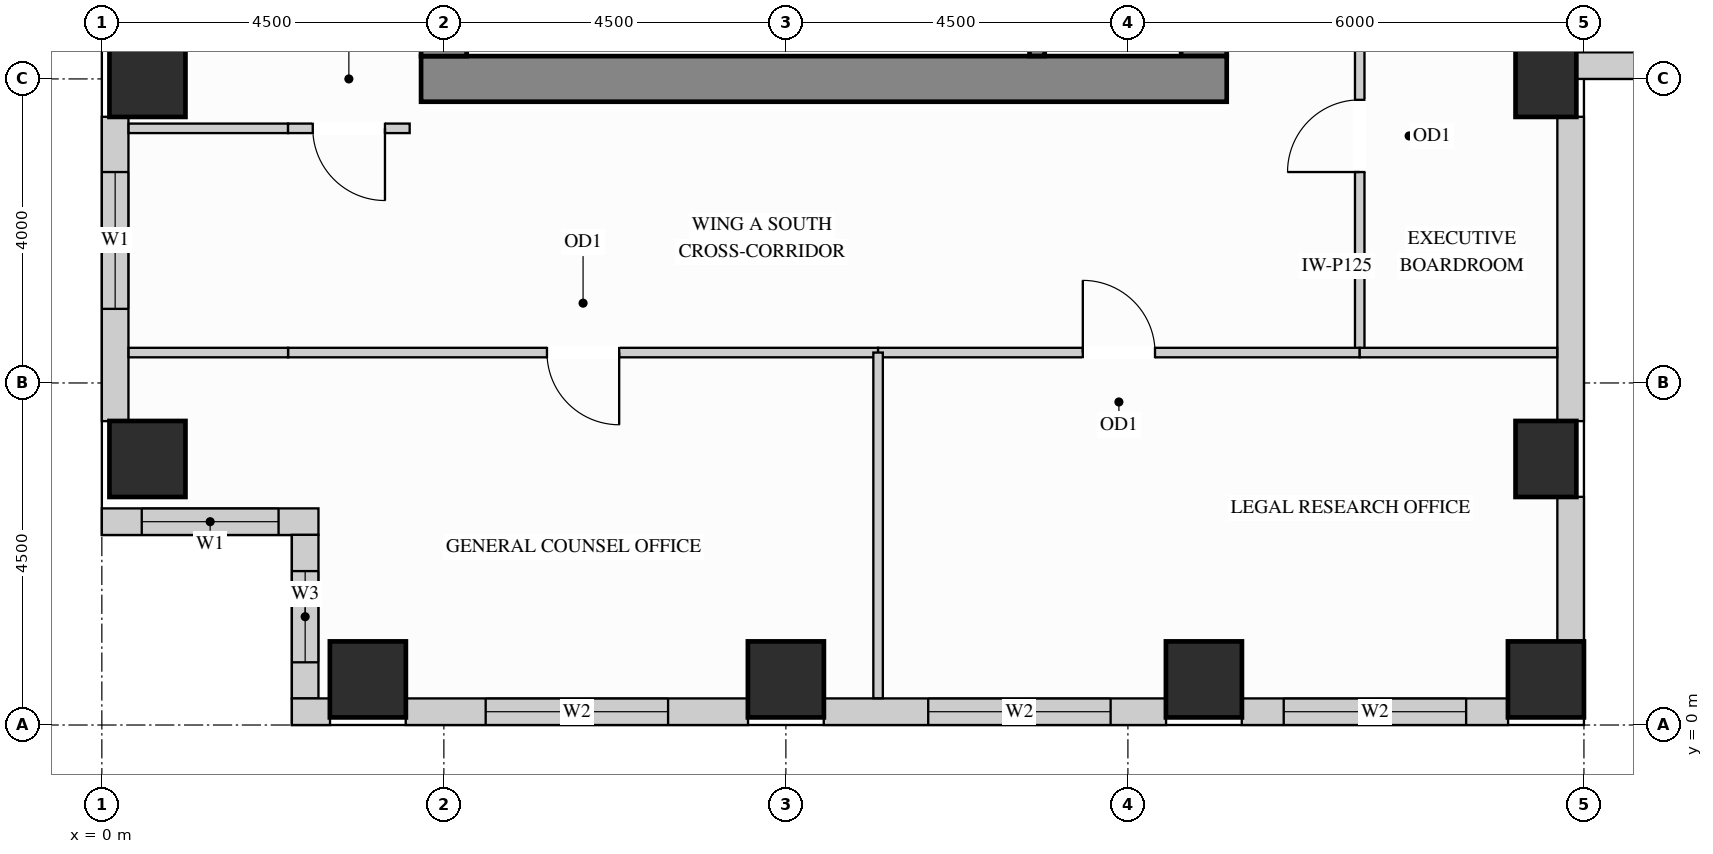
"""IFC4 building model, lengths in metres.
Left out: names, types, materials, properties, quantities, classifications, styles, units other than length and angle.
Written with IfcOpenShell. Run it as: python <this file> out.ifc"""

import sys

from ifc_helpers import new_model, si_unit, direction, frame, frame_2d, origin, origin_2d, place, context, subcontext, project, spatial, rectangle, extrude, source, transform, mapped, element, fill, save


model = new_model("IFC4")
c1 = context("Model", 3, precision=1e-05, world=origin(), true_north=direction((0.0, 1.0)))
c2 = subcontext(c1, "Body", "Model", "MODEL_VIEW")
j1 = project(units=[si_unit("LENGTHUNIT", "METRE"), si_unit("PLANEANGLEUNIT", "RADIAN")], contexts=[c1])
p1 = place(None, origin())
s1 = spatial("IfcSite", under=j1, at=p1, CompositionType="ELEMENT")
p2 = place(p1, origin())
s2 = spatial("IfcBuilding", under=s1, at=p2, CompositionType="ELEMENT")
p3 = place(p2, frame((0.0, 0.0, 179.1)))
s3 = spatial("IfcBuildingStorey", under=s2, at=p3, CompositionType="ELEMENT", Elevation=179.1)
m1 = source(origin(), c2, "Body", "SweptSolid", [
    extrude(rectangle(XDim=0.8, YDim=1.0, at=origin_2d()), origin(), (0.0, 0.0, 1.0), 3.4),
])
for number, where, z_axis, x_axis in (
    (1, (19.0, 3.5, 0.0), (0.0, 0.0, 1.0), (1.0, 0.0, 0.0)),
    (2, (19.0, 8.5, 0.0), (0.0, 0.0, 1.0), (1.0, 0.0, 0.0)),
):
    element("IfcColumn", number, at=place(p3, frame(where, z_axis=z_axis, x_axis=x_axis)), inside=s3, PredefinedType="COLUMN", context=c2, shape_type="MappedRepresentation", body=[
        mapped(m1, transform((0.0, 0.0, 0.0), x_axis=(1.0, 0.0, 0.0), y_axis=(0.0, 1.0, 0.0), z_axis=(0.0, 0.0, 1.0))),
    ])
m2 = source(origin(), c2, "Body", "SweptSolid", [
    extrude(rectangle(XDim=1.0, YDim=1.0, at=origin_2d()), origin(), (0.0, 0.0, 1.0), 3.4),
])
for number, where, z_axis, x_axis in (
    (3, (14.5, 0.6, 0.0), (0.0, 0.0, 1.0), (1.0, 0.0, 0.0)),
    (4, (19.0, 0.6, 0.0), (0.0, 0.0, 1.0), (1.0, 0.0, 0.0)),
    (5, (3.5, 0.6, 0.0), (0.0, 0.0, 1.0), (1.0, 0.0, 0.0)),
    (6, (9.0, 0.6, 0.0), (0.0, 0.0, 1.0), (1.0, 0.0, 0.0)),
    (7, (0.6, 3.5, 0.0), (0.0, 0.0, 1.0), (1.0, 0.0, 0.0)),
    (8, (0.6, 8.5, 0.0), (0.0, 0.0, 1.0), (1.0, 0.0, 0.0)),
):
    element("IfcColumn", number, at=place(p3, frame(where, z_axis=z_axis, x_axis=x_axis)), inside=s3, PredefinedType="COLUMN", context=c2, shape_type="MappedRepresentation", body=[
        mapped(m2, transform((0.0, 0.0, 0.0), x_axis=(1.0, 0.0, 0.0), y_axis=(0.0, 1.0, 0.0), z_axis=(0.0, 0.0, 1.0))),
    ])
m3 = source(origin(), c2, "Body", "SweptSolid", [
    extrude(rectangle(XDim=10.02, YDim=0.6, at=frame_2d((5.01, 0.0))), origin(), (0.0, 0.0, 1.0), 3.4),
])
p4 = place(p3, frame((14.5, 8.8, 0.0), z_axis=(0.0, 0.0, 1.0), x_axis=(0.0, 1.0, 0.0)))
e9 = element("IfcWall", 9, at=p4, inside=s3, PredefinedType="SHEAR", context=c2, shape_type="MappedRepresentation", body=[
    mapped(m3, transform((0.0, 0.0, 0.0), x_axis=(1.0, 0.0, 0.0), y_axis=(0.0, 1.0, 0.0), z_axis=(0.0, 0.0, 1.0))),
])
m4 = source(origin(), c2, "Body", "SweptSolid", [
    extrude(rectangle(XDim=10.6, YDim=0.6, at=frame_2d((5.3, 0.0))), origin(), (0.0, 0.0, 1.0), 3.4),
])
p5 = place(p3, frame((4.2, 8.5, 0.0), z_axis=(0.0, 0.0, 1.0), x_axis=(1.0, 0.0, 0.0)))
e10 = element("IfcWall", 10, at=p5, inside=s3, PredefinedType="SHEAR", context=c2, shape_type="MappedRepresentation", body=[
    mapped(m4, transform((0.0, 0.0, 0.0), x_axis=(1.0, 0.0, 0.0), y_axis=(0.0, 1.0, 0.0), z_axis=(0.0, 0.0, 1.0))),
])
m5 = source(origin(), c2, "Body", "SweptSolid", [
    extrude(rectangle(XDim=20.4, YDim=0.6, at=frame_2d((10.2, 0.0))), origin(), (0.0, 0.0, 1.0), 3.4),
])
p6 = place(p3, frame((4.5, 8.8, 0.0), z_axis=(0.0, 0.0, 1.0), x_axis=(0.0, 1.0, 0.0)))
e11 = element("IfcWall", 11, at=p6, inside=s3, PredefinedType="SHEAR", context=c2, shape_type="MappedRepresentation", body=[
    mapped(m5, transform((0.0, 0.0, 0.0), x_axis=(1.0, 0.0, 0.0), y_axis=(0.0, 1.0, 0.0), z_axis=(0.0, 0.0, 1.0))),
])
p7 = place(p3, frame((0.175, 8.002, 0.0), z_axis=(0.0, 0.0, 1.0), x_axis=(0.0, -1.0, 0.0)))
e12 = element("IfcWall", 12, at=p7, inside=s3, PredefinedType="SOLIDWALL", context=c2, shape_type="SweptSolid", body=[
    extrude(rectangle(XDim=4.004, YDim=0.35, at=frame_2d((2.002, 0.0))), origin(), (0.0, 0.0, 1.0), 2.612),
])
p8 = place(p7, frame((0.727, 0.0, 0.78)))
e13 = element("IfcOpeningElement", 13, at=p8, cuts=e12, PredefinedType="OPENING", context=c2, shape_type="SweptSolid", body=[
    extrude(rectangle(XDim=1.8, YDim=1.652, at=frame_2d((0.9, 0.826))), frame((0.0, 0.185, 0.0), z_axis=(0.0, -1.0, 0.0), x_axis=(1.0, 0.0, 0.0)), (0.0, 0.0, 1.0), 0.37),
])
p9 = place(p3, frame((0.0, 2.675, 0.0), z_axis=(0.0, 0.0, 1.0), x_axis=(1.0, 0.0, 0.0)))
e14 = element("IfcWall", 14, at=p9, inside=s3, PredefinedType="SOLIDWALL", context=c2, shape_type="SweptSolid", body=[
    extrude(rectangle(XDim=2.85, YDim=0.35, at=frame_2d((1.425, 0.0))), origin(), (0.0, 0.0, 1.0), 3.385),
])
p10 = place(p9, frame((0.525, 0.0, 0.78)))
e15 = element("IfcOpeningElement", 15, at=p10, cuts=e14, PredefinedType="OPENING", context=c2, shape_type="SweptSolid", body=[
    extrude(rectangle(XDim=1.8, YDim=2.1, at=frame_2d((0.9, 1.05))), frame((0.0, 0.185, 0.0), z_axis=(0.0, -1.0, 0.0), x_axis=(1.0, 0.0, 0.0)), (0.0, 0.0, 1.0), 0.37),
])
p11 = place(p3, frame((2.675, 2.502, 0.0), z_axis=(0.0, 0.0, 1.0), x_axis=(0.0, -1.0, 0.0)))
e16 = element("IfcWall", 16, at=p11, inside=s3, PredefinedType="SOLIDWALL", context=c2, shape_type="SweptSolid", body=[
    extrude(rectangle(XDim=2.154, YDim=0.35, at=frame_2d((1.077, 0.0))), origin(), (0.0, 0.0, 1.0), 3.385),
])
p12 = place(p11, frame((0.477, 0.0, 0.78)))
e17 = element("IfcOpeningElement", 17, at=p12, cuts=e16, PredefinedType="OPENING", context=c2, shape_type="SweptSolid", body=[
    extrude(rectangle(XDim=1.2, YDim=2.1, at=frame_2d((0.6, 1.05))), frame((0.0, 0.185, 0.0), z_axis=(0.0, -1.0, 0.0), x_axis=(1.0, 0.0, 0.0)), (0.0, 0.0, 1.0), 0.37),
])
m6 = source(origin(), c2, "Body", "SweptSolid", [
    extrude(rectangle(XDim=0.502, YDim=0.35, at=frame_2d((0.251, 0.0))), origin(), (0.0, 0.0, 1.0), 3.385),
])
p13 = place(p3, frame((2.5, 0.175, 0.0), z_axis=(0.0, 0.0, 1.0), x_axis=(1.0, 0.0, 0.0)))
e18 = element("IfcWall", 18, at=p13, inside=s3, PredefinedType="SOLIDWALL", context=c2, shape_type="MappedRepresentation", body=[
    mapped(m6, transform((0.0, 0.0, 0.0), x_axis=(1.0, 0.0, 0.0), y_axis=(0.0, 1.0, 0.0), z_axis=(0.0, 0.0, 1.0))),
])
p14 = place(p3, frame((3.998, 0.175, 0.0), z_axis=(0.0, 0.0, 1.0), x_axis=(1.0, 0.0, 0.0)))
e19 = element("IfcWall", 19, at=p14, inside=s3, PredefinedType="SOLIDWALL", context=c2, shape_type="SweptSolid", body=[
    extrude(rectangle(XDim=4.504, YDim=0.35, at=frame_2d((2.252, 0.0))), origin(), (0.0, 0.0, 1.0), 2.612),
])
p15 = place(p14, frame((1.052, 0.0, 0.78)))
e20 = element("IfcOpeningElement", 20, at=p15, cuts=e19, PredefinedType="OPENING", context=c2, shape_type="SweptSolid", body=[
    extrude(rectangle(XDim=2.4, YDim=1.652, at=frame_2d((1.2, 0.826))), frame((0.0, 0.185, 0.0), z_axis=(0.0, -1.0, 0.0), x_axis=(1.0, 0.0, 0.0)), (0.0, 0.0, 1.0), 0.37),
])
p16 = place(p3, frame((9.498, 0.175, 0.0), z_axis=(0.0, 0.0, 1.0), x_axis=(1.0, 0.0, 0.0)))
e21 = element("IfcWall", 21, at=p16, inside=s3, PredefinedType="SOLIDWALL", context=c2, shape_type="SweptSolid", body=[
    extrude(rectangle(XDim=4.504, YDim=0.35, at=frame_2d((2.252, 0.0))), origin(), (0.0, 0.0, 1.0), 2.612),
])
p17 = place(p16, frame((1.375, 0.0, 0.78)))
e22 = element("IfcOpeningElement", 22, at=p17, cuts=e21, PredefinedType="OPENING", context=c2, shape_type="SweptSolid", body=[
    extrude(rectangle(XDim=2.4, YDim=1.652, at=frame_2d((1.2, 0.826))), frame((0.0, 0.185, 0.0), z_axis=(0.0, -1.0, 0.0), x_axis=(1.0, 0.0, 0.0)), (0.0, 0.0, 1.0), 0.37),
])
p18 = place(p3, frame((14.998, 0.175, 0.0), z_axis=(0.0, 0.0, 1.0), x_axis=(1.0, 0.0, 0.0)))
e23 = element("IfcWall", 23, at=p18, inside=s3, PredefinedType="SOLIDWALL", context=c2, shape_type="SweptSolid", body=[
    extrude(rectangle(XDim=3.504, YDim=0.35, at=frame_2d((1.752, 0.0))), origin(), (0.0, 0.0, 1.0), 2.612),
])
p19 = place(p18, frame((0.552, 0.0, 0.78)))
e24 = element("IfcOpeningElement", 24, at=p19, cuts=e23, PredefinedType="OPENING", context=c2, shape_type="SweptSolid", body=[
    extrude(rectangle(XDim=2.4, YDim=1.652, at=frame_2d((1.2, 0.826))), frame((0.0, 0.185, 0.0), z_axis=(0.0, -1.0, 0.0), x_axis=(1.0, 0.0, 0.0)), (0.0, 0.0, 1.0), 0.37),
])
m7 = source(origin(), c2, "Body", "SweptSolid", [
    extrude(rectangle(XDim=1.904, YDim=0.35, at=frame_2d((0.952, 0.0))), origin(), (0.0, 0.0, 1.0), 2.612),
])
p20 = place(p3, frame((19.325, 1.098, 0.0), z_axis=(0.0, 0.0, 1.0), x_axis=(0.0, 1.0, 0.0)))
e25 = element("IfcWall", 25, at=p20, inside=s3, PredefinedType="SOLIDWALL", context=c2, shape_type="MappedRepresentation", body=[
    mapped(m7, transform((0.0, 0.0, 0.0), x_axis=(1.0, 0.0, 0.0), y_axis=(0.0, 1.0, 0.0), z_axis=(0.0, 0.0, 1.0))),
])
m8 = source(origin(), c2, "Body", "SweptSolid", [
    extrude(rectangle(XDim=4.004, YDim=0.35, at=frame_2d((2.002, 0.0))), origin(), (0.0, 0.0, 1.0), 2.612),
])
p21 = place(p3, frame((19.325, 3.998, 0.0), z_axis=(0.0, 0.0, 1.0), x_axis=(0.0, 1.0, 0.0)))
e26 = element("IfcWall", 26, at=p21, inside=s3, PredefinedType="SOLIDWALL", context=c2, shape_type="MappedRepresentation", body=[
    mapped(m8, transform((0.0, 0.0, 0.0), x_axis=(1.0, 0.0, 0.0), y_axis=(0.0, 1.0, 0.0), z_axis=(0.0, 0.0, 1.0))),
])
p22 = place(p3, frame((19.398, 8.675, 0.0), z_axis=(0.0, 0.0, 1.0), x_axis=(1.0, 0.0, 0.0)))
e27 = element("IfcWall", 27, at=p22, inside=s3, PredefinedType="SOLIDWALL", context=c2, shape_type="SweptSolid", body=[
    extrude(rectangle(XDim=3.604, YDim=0.35, at=frame_2d((1.802, 0.0))), origin(), (0.0, 0.0, 1.0), 3.385),
])
p23 = place(p22, frame((1.067, 0.0, 0.78)))
e28 = element("IfcOpeningElement", 28, at=p23, cuts=e27, PredefinedType="OPENING", context=c2, shape_type="SweptSolid", body=[
    extrude(rectangle(XDim=1.5, YDim=2.0, at=frame_2d((0.75, 1.0))), frame((0.0, 0.185, 0.0), z_axis=(0.0, -1.0, 0.0), x_axis=(1.0, 0.0, 0.0)), (0.0, 0.0, 1.0), 0.37),
])
p24 = place(p3, frame((16.55, 4.9, 0.0), z_axis=(0.0, 0.0, 1.0), x_axis=(0.0, 1.0, 0.0)))
e29 = element("IfcWall", 29, at=p24, inside=s3, PredefinedType="PARTITIONING", context=c2, shape_type="SweptSolid", body=[
    extrude(rectangle(XDim=5.7, YDim=0.125, at=frame_2d((2.85, 0.0))), origin(), (0.0, 0.0, 1.0), 3.385),
])
p25 = place(p24, frame((2.375, 0.0, 0.0)))
e30 = element("IfcOpeningElement", 30, at=p25, cuts=e29, PredefinedType="OPENING", context=c2, shape_type="SweptSolid", body=[
    extrude(rectangle(XDim=0.95, YDim=2.15, at=frame_2d((0.475, 1.075))), frame((0.0, 0.073, 0.0), z_axis=(0.0, -1.0, 0.0), x_axis=(1.0, 0.0, 0.0)), (0.0, 0.0, 1.0), 0.145),
])
m9 = source(origin(), c2, "Body", "SweptSolid", [
    extrude(rectangle(XDim=2.098, YDim=0.125, at=frame_2d((1.049, 0.0))), origin(), (0.0, 0.0, 1.0), 3.385),
])
p26 = place(p3, frame((0.352, 7.85, 0.0), z_axis=(0.0, 0.0, 1.0), x_axis=(1.0, 0.0, 0.0)))
e31 = element("IfcWall", 31, at=p26, inside=s3, PredefinedType="PARTITIONING", context=c2, shape_type="MappedRepresentation", body=[
    mapped(m9, transform((0.0, 0.0, 0.0), x_axis=(1.0, 0.0, 0.0), y_axis=(0.0, 1.0, 0.0), z_axis=(0.0, 0.0, 1.0))),
])
p27 = place(p3, frame((2.45, 7.85, 0.0), z_axis=(0.0, 0.0, 1.0), x_axis=(1.0, 0.0, 0.0)))
e32 = element("IfcWall", 32, at=p27, inside=s3, PredefinedType="PARTITIONING", context=c2, shape_type="SweptSolid", body=[
    extrude(rectangle(XDim=1.6, YDim=0.125, at=frame_2d((0.8, 0.0))), origin(), (0.0, 0.0, 1.0), 3.385),
])
p28 = place(p27, frame((0.325, 0.0, 0.0)))
e33 = element("IfcOpeningElement", 33, at=p28, cuts=e32, PredefinedType="OPENING", context=c2, shape_type="SweptSolid", body=[
    extrude(rectangle(XDim=0.95, YDim=2.15, at=frame_2d((0.475, 1.075))), frame((0.0, 0.073, 0.0), z_axis=(0.0, -1.0, 0.0), x_axis=(1.0, 0.0, 0.0)), (0.0, 0.0, 1.0), 0.145),
])
p29 = place(p3, frame((2.45, 4.9, 0.0), z_axis=(0.0, 0.0, 1.0), x_axis=(1.0, 0.0, 0.0)))
e34 = element("IfcWall", 34, at=p29, inside=s3, PredefinedType="PARTITIONING", context=c2, shape_type="SweptSolid", body=[
    extrude(rectangle(XDim=7.763, YDim=0.125, at=frame_2d((3.881, 0.0))), origin(), (0.0, 0.0, 1.0), 2.848),
])
p30 = place(p29, frame((3.406, 0.0, 0.0)))
e35 = element("IfcOpeningElement", 35, at=p30, cuts=e34, PredefinedType="OPENING", context=c2, shape_type="SweptSolid", body=[
    extrude(rectangle(XDim=0.95, YDim=2.15, at=frame_2d((0.475, 1.075))), frame((0.0, 0.073, 0.0), z_axis=(0.0, -1.0, 0.0), x_axis=(1.0, 0.0, 0.0)), (0.0, 0.0, 1.0), 0.145),
])
p31 = place(p3, frame((10.213, 4.9, 0.0), z_axis=(0.0, 0.0, 1.0), x_axis=(1.0, 0.0, 0.0)))
e36 = element("IfcWall", 36, at=p31, inside=s3, PredefinedType="PARTITIONING", context=c2, shape_type="SweptSolid", body=[
    extrude(rectangle(XDim=6.337, YDim=0.125, at=frame_2d((3.168, 0.0))), origin(), (0.0, 0.0, 1.0), 2.848),
])
p32 = place(p31, frame((2.694, 0.0, 0.0)))
e37 = element("IfcOpeningElement", 37, at=p32, cuts=e36, PredefinedType="OPENING", context=c2, shape_type="SweptSolid", body=[
    extrude(rectangle(XDim=0.95, YDim=2.15, at=frame_2d((0.475, 1.075))), frame((0.0, 0.073, 0.0), z_axis=(0.0, -1.0, 0.0), x_axis=(1.0, 0.0, 0.0)), (0.0, 0.0, 1.0), 0.145),
])
m10 = source(origin(), c2, "Body", "SweptSolid", [
    extrude(rectangle(XDim=2.098, YDim=0.125, at=frame_2d((1.049, 0.0))), origin(), (0.0, 0.0, 1.0), 2.848),
])
p33 = place(p3, frame((0.352, 4.9, 0.0), z_axis=(0.0, 0.0, 1.0), x_axis=(1.0, 0.0, 0.0)))
e38 = element("IfcWall", 38, at=p33, inside=s3, PredefinedType="PARTITIONING", context=c2, shape_type="MappedRepresentation", body=[
    mapped(m10, transform((0.0, 0.0, 0.0), x_axis=(1.0, 0.0, 0.0), y_axis=(0.0, 1.0, 0.0), z_axis=(0.0, 0.0, 1.0))),
])
m11 = source(origin(), c2, "Body", "SweptSolid", [
    extrude(rectangle(XDim=2.598, YDim=0.125, at=frame_2d((1.299, 0.0))), origin(), (0.0, 0.0, 1.0), 2.848),
])
p34 = place(p3, frame((16.55, 4.9, 0.0), z_axis=(0.0, 0.0, 1.0), x_axis=(1.0, 0.0, 0.0)))
e39 = element("IfcWall", 39, at=p34, inside=s3, PredefinedType="PARTITIONING", context=c2, shape_type="MappedRepresentation", body=[
    mapped(m11, transform((0.0, 0.0, 0.0), x_axis=(1.0, 0.0, 0.0), y_axis=(0.0, 1.0, 0.0), z_axis=(0.0, 0.0, 1.0))),
])
m12 = source(origin(), c2, "Body", "SweptSolid", [
    extrude(rectangle(XDim=4.548, YDim=0.125, at=frame_2d((2.274, 0.0))), origin(), (0.0, 0.0, 1.0), 3.385),
])
p35 = place(p3, frame((10.213, 0.352, 0.0), z_axis=(0.0, 0.0, 1.0), x_axis=(0.0, 1.0, 0.0)))
e40 = element("IfcWall", 40, at=p35, inside=s3, PredefinedType="PARTITIONING", context=c2, shape_type="MappedRepresentation", body=[
    mapped(m12, transform((0.0, 0.0, 0.0), x_axis=(1.0, 0.0, 0.0), y_axis=(0.0, 1.0, 0.0), z_axis=(0.0, 0.0, 1.0))),
])
m13 = source(origin(), c2, "Body", "SweptSolid", [
    extrude(rectangle(XDim=3.753, YDim=0.2, at=frame_2d((1.876, 0.0))), origin(), (0.0, 0.0, 1.0), 3.4),
])
p36 = place(p3, frame((12.305, 8.802, 0.0), z_axis=(0.0, 0.0, 1.0), x_axis=(0.0, 1.0, 0.0)))
e41 = element("IfcWall", 41, at=p36, inside=s3, PredefinedType="SHEAR", context=c2, shape_type="MappedRepresentation", body=[
    mapped(m13, transform((0.0, 0.0, 0.0), x_axis=(1.0, 0.0, 0.0), y_axis=(0.0, 1.0, 0.0), z_axis=(0.0, 0.0, 1.0))),
])
m14 = source(origin(), c2, "Body", "SweptSolid", [
    extrude(rectangle(XDim=0.95, YDim=2.15, at=frame_2d((0.475, 1.075))), frame((0.0, 0.025, 0.0), z_axis=(0.0, -1.0, 0.0), x_axis=(1.0, 0.0, 0.0)), (0.0, 0.0, 1.0), 0.05),
])
p37 = place(p25, origin())
e42 = element("IfcDoor", 42, at=p37, inside=s3, OperationType="SINGLE_SWING_LEFT", PredefinedType="DOOR", context=c2, shape_type="MappedRepresentation", body=[
    mapped(m14, transform((0.0, 0.0, 0.0), x_axis=(1.0, 0.0, 0.0), y_axis=(0.0, 1.0, 0.0), z_axis=(0.0, 0.0, 1.0))),
])
fill(e30, e42)
p38 = place(p30, origin())
e43 = element("IfcDoor", 43, at=p38, inside=s3, OperationType="SINGLE_SWING_RIGHT", PredefinedType="DOOR", context=c2, shape_type="MappedRepresentation", body=[
    mapped(m14, transform((0.0, 0.0, 0.0), x_axis=(1.0, 0.0, 0.0), y_axis=(0.0, 1.0, 0.0), z_axis=(0.0, 0.0, 1.0))),
])
fill(e35, e43)
p39 = place(p32, origin())
e44 = element("IfcDoor", 44, at=p39, inside=s3, OperationType="SINGLE_SWING_LEFT", PredefinedType="DOOR", context=c2, shape_type="MappedRepresentation", body=[
    mapped(m14, transform((0.0, 0.0, 0.0), x_axis=(1.0, 0.0, 0.0), y_axis=(0.0, 1.0, 0.0), z_axis=(0.0, 0.0, 1.0))),
])
fill(e37, e44)
p40 = place(p28, origin())
e45 = element("IfcDoor", 45, at=p40, inside=s3, OperationType="SINGLE_SWING_RIGHT", PredefinedType="DOOR", context=c2, shape_type="MappedRepresentation", body=[
    mapped(m14, transform((0.0, 0.0, 0.0), x_axis=(1.0, 0.0, 0.0), y_axis=(0.0, 1.0, 0.0), z_axis=(0.0, 0.0, 1.0))),
])
fill(e33, e45)
m15 = source(origin(), c2, "Body", "SweptSolid", [
    extrude(rectangle(XDim=1.8, YDim=1.652, at=frame_2d((0.9, 0.826))), frame((0.0, 0.03, 0.0), z_axis=(0.0, -1.0, 0.0), x_axis=(1.0, 0.0, 0.0)), (0.0, 0.0, 1.0), 0.06),
])
p41 = place(p8, origin())
e46 = element("IfcWindow", 46, at=p41, inside=s3, PartitioningType="SINGLE_PANEL", PredefinedType="WINDOW", context=c2, shape_type="MappedRepresentation", body=[
    mapped(m15, transform((0.0, 0.0, 0.0), x_axis=(1.0, 0.0, 0.0), y_axis=(0.0, 1.0, 0.0), z_axis=(0.0, 0.0, 1.0))),
])
fill(e13, e46)
m16 = source(origin(), c2, "Body", "SweptSolid", [
    extrude(rectangle(XDim=1.8, YDim=2.1, at=frame_2d((0.9, 1.05))), frame((0.0, 0.03, 0.0), z_axis=(0.0, -1.0, 0.0), x_axis=(1.0, 0.0, 0.0)), (0.0, 0.0, 1.0), 0.06),
])
p42 = place(p10, origin())
e47 = element("IfcWindow", 47, at=p42, inside=s3, PartitioningType="SINGLE_PANEL", PredefinedType="WINDOW", context=c2, shape_type="MappedRepresentation", body=[
    mapped(m16, transform((0.0, 0.0, 0.0), x_axis=(1.0, 0.0, 0.0), y_axis=(0.0, 1.0, 0.0), z_axis=(0.0, 0.0, 1.0))),
])
fill(e15, e47)
m17 = source(origin(), c2, "Body", "SweptSolid", [
    extrude(rectangle(XDim=2.4, YDim=1.652, at=frame_2d((1.2, 0.826))), frame((0.0, 0.03, 0.0), z_axis=(0.0, -1.0, 0.0), x_axis=(1.0, 0.0, 0.0)), (0.0, 0.0, 1.0), 0.06),
])
p43 = place(p15, origin())
e48 = element("IfcWindow", 48, at=p43, inside=s3, PartitioningType="SINGLE_PANEL", PredefinedType="WINDOW", context=c2, shape_type="MappedRepresentation", body=[
    mapped(m17, transform((0.0, 0.0, 0.0), x_axis=(1.0, 0.0, 0.0), y_axis=(0.0, 1.0, 0.0), z_axis=(0.0, 0.0, 1.0))),
])
fill(e20, e48)
p44 = place(p17, origin())
e49 = element("IfcWindow", 49, at=p44, inside=s3, PartitioningType="SINGLE_PANEL", PredefinedType="WINDOW", context=c2, shape_type="MappedRepresentation", body=[
    mapped(m17, transform((0.0, 0.0, 0.0), x_axis=(1.0, 0.0, 0.0), y_axis=(0.0, 1.0, 0.0), z_axis=(0.0, 0.0, 1.0))),
])
fill(e22, e49)
p45 = place(p19, origin())
e50 = element("IfcWindow", 50, at=p45, inside=s3, PartitioningType="SINGLE_PANEL", PredefinedType="WINDOW", context=c2, shape_type="MappedRepresentation", body=[
    mapped(m17, transform((0.0, 0.0, 0.0), x_axis=(1.0, 0.0, 0.0), y_axis=(0.0, 1.0, 0.0), z_axis=(0.0, 0.0, 1.0))),
])
fill(e24, e50)
m18 = source(origin(), c2, "Body", "SweptSolid", [
    extrude(rectangle(XDim=1.2, YDim=2.1, at=frame_2d((0.6, 1.05))), frame((0.0, 0.03, 0.0), z_axis=(0.0, -1.0, 0.0), x_axis=(1.0, 0.0, 0.0)), (0.0, 0.0, 1.0), 0.06),
])
p46 = place(p12, origin())
e51 = element("IfcWindow", 51, at=p46, inside=s3, PartitioningType="SINGLE_PANEL", PredefinedType="WINDOW", context=c2, shape_type="MappedRepresentation", body=[
    mapped(m18, transform((0.0, 0.0, 0.0), x_axis=(1.0, 0.0, 0.0), y_axis=(0.0, 1.0, 0.0), z_axis=(0.0, 0.0, 1.0))),
])
fill(e17, e51)
save(model, sys.argv[1])
